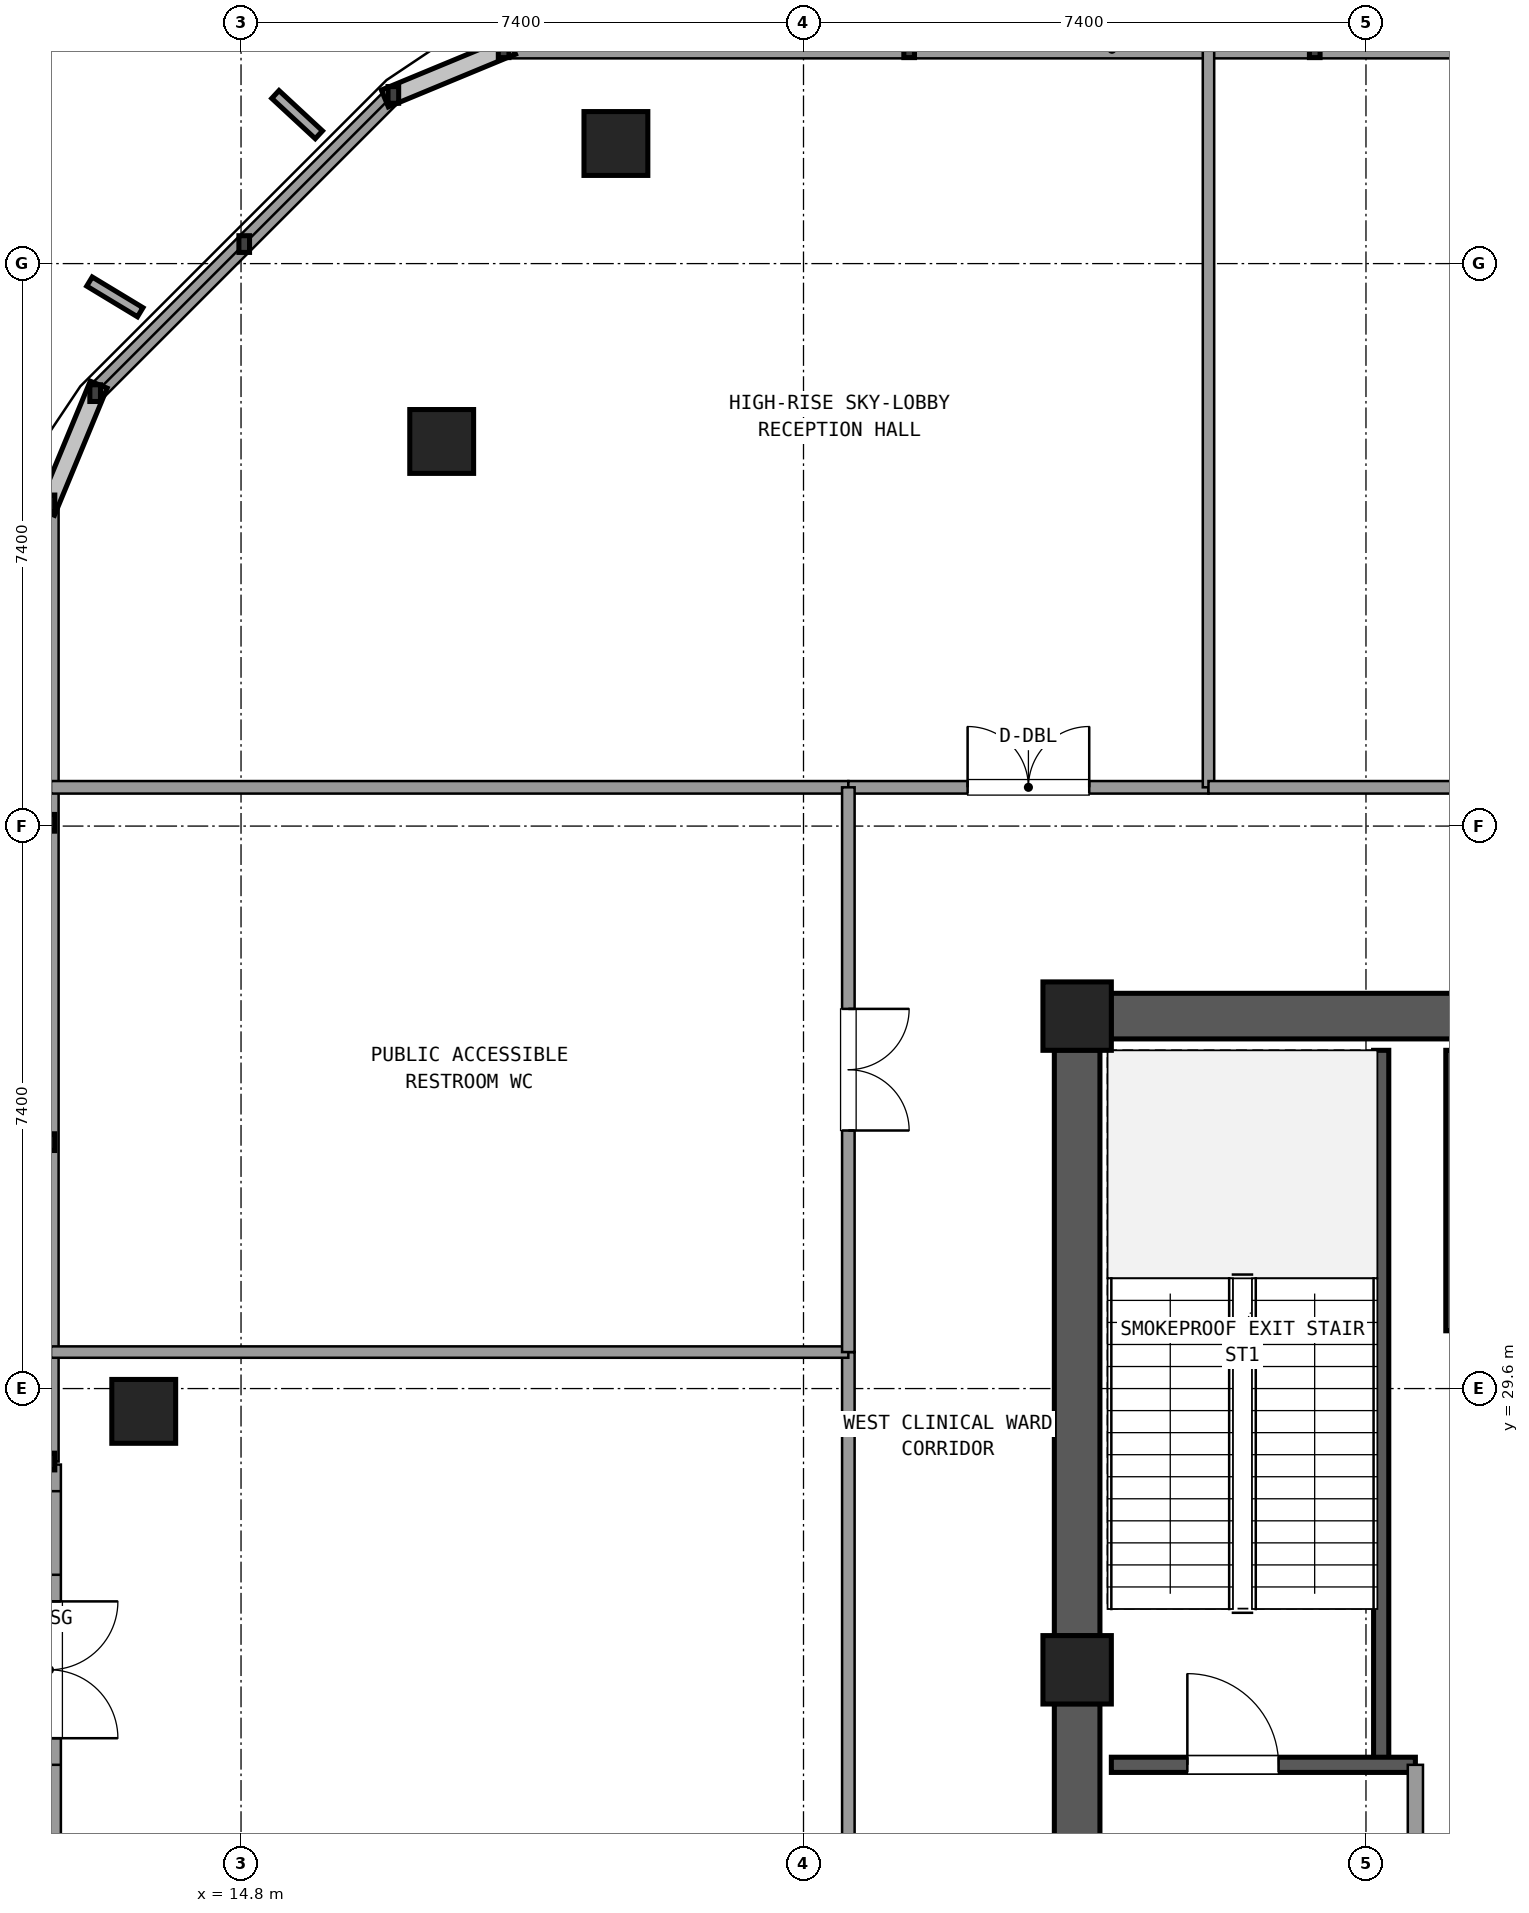
"""IFC4 building model, lengths in metres.
Left out: names, types, materials, properties, quantities, classifications, styles, units other than length and angle.
Written with IfcOpenShell. Run it as: python <this file> out.ifc"""

import sys

from ifc_helpers import new_model, si_unit, direction, frame, frame_2d, origin, origin_2d, place, context, subcontext, project, spatial, rectangle, extrude, element, fill, save


model = new_model("IFC4")
c1 = context("Model", 3, precision=1e-05, world=origin(), true_north=direction((0.0, 1.0)))
c2 = subcontext(c1, "Body", "Model", "MODEL_VIEW")
j1 = project(units=[si_unit("LENGTHUNIT", "METRE"), si_unit("PLANEANGLEUNIT", "RADIAN")], contexts=[c1])
p1 = place(None, origin())
s1 = spatial("IfcSite", under=j1, at=p1, CompositionType="ELEMENT")
p2 = place(p1, origin())
s2 = spatial("IfcBuilding", under=s1, at=p2, CompositionType="ELEMENT")
p3 = place(p2, frame((0.0, 0.0, 237.06)))
s3 = spatial("IfcBuildingStorey", under=s2, at=p3, CompositionType="ELEMENT", Elevation=237.06)
for number, where, z_axis, x_axis in (
    (1, (25.8, 34.5, 0.0), (0.0, 0.0, 1.0), (1.0, 0.0, 0.0)),
    (2, (25.8, 25.9, 0.0), (0.0, 0.0, 1.0), (1.0, 0.0, 0.0)),
):
    element("IfcColumn", number, at=place(p3, frame(where, z_axis=z_axis, x_axis=x_axis)), inside=s3, PredefinedType="COLUMN", context=c2, shape_type="SweptSolid", body=[
        extrude(rectangle(XDim=0.9, YDim=0.9, at=origin_2d()), origin(), (0.0, 0.0, 1.0), 5.76),
    ])
p4 = place(p3, frame((36.555, 34.5, 0.0), z_axis=(0.0, 0.0, 1.0), x_axis=(-1.0, 0.0, 0.0)))
e3 = element("IfcWall", 3, at=p4, inside=s3, PredefinedType="SHEAR", context=c2, shape_type="SweptSolid", body=[
    extrude(rectangle(XDim=10.31, YDim=0.6, at=frame_2d((5.155, 0.0))), origin(), (0.0, 0.0, 1.0), 5.48),
])
p5 = place(p4, frame((4.155, 0.0, 0.0)))
e4 = element("IfcOpeningElement", 4, at=p5, cuts=e3, PredefinedType="OPENING", context=c2, shape_type="SweptSolid", body=[
    extrude(rectangle(XDim=1.2, YDim=2.15, at=frame_2d((0.6, 1.075))), frame((0.0, 0.31, 0.0), z_axis=(0.0, -1.0, 0.0), x_axis=(1.0, 0.0, 0.0)), (0.0, 0.0, 1.0), 0.62),
])
p6 = place(p3, frame((25.8, 34.055, 0.0), z_axis=(0.0, 0.0, 1.0), x_axis=(0.0, -1.0, 0.0)))
e5 = element("IfcWall", 5, at=p6, inside=s3, PredefinedType="SHEAR", context=c2, shape_type="SweptSolid", body=[
    extrude(rectangle(XDim=7.71, YDim=0.6, at=frame_2d((3.855, 0.0))), origin(), (0.0, 0.0, 1.0), 5.48),
])
p7 = place(p3, frame((25.8, 25.455, 0.0), z_axis=(0.0, 0.0, 1.0), x_axis=(0.0, -1.0, 0.0)))
e6 = element("IfcWall", 6, at=p7, inside=s3, PredefinedType="SHEAR", context=c2, shape_type="SweptSolid", body=[
    extrude(rectangle(XDim=7.71, YDim=0.6, at=frame_2d((3.855, 0.0))), origin(), (0.0, 0.0, 1.0), 5.48),
])
p8 = place(p7, frame((2.205, 0.0, 0.0)))
e7 = element("IfcOpeningElement", 7, at=p8, cuts=e6, PredefinedType="OPENING", context=c2, shape_type="SweptSolid", body=[
    extrude(rectangle(XDim=1.2, YDim=2.15, at=frame_2d((0.6, 1.075))), frame((0.0, 0.31, 0.0), z_axis=(0.0, -1.0, 0.0), x_axis=(1.0, 0.0, 0.0)), (0.0, 0.0, 1.0), 0.62),
])
for number, where, z_axis, x_axis in (
    (8, (19.732, 45.98, 0.0), (0.0, 0.0, 1.0), (1.0, 0.0, 0.0)),
    (9, (17.44, 42.06, 0.0), (0.0, 0.0, 1.0), (1.0, 0.0, 0.0)),
    (10, (13.52, 29.3, 0.0), (0.0, 0.0, 1.0), (1.0, 0.0, 0.0)),
):
    element("IfcColumn", number, at=place(p3, frame(where, z_axis=z_axis, x_axis=x_axis)), inside=s3, PredefinedType="COLUMN", context=c2, shape_type="SweptSolid", body=[
        extrude(rectangle(XDim=0.84, YDim=0.84, at=origin_2d()), origin(), (0.0, 0.0, 1.0), 5.76),
    ])
p9 = place(p3, frame((34.261, 47.22, 0.0), z_axis=(0.0, 0.0, 1.0), x_axis=(-1.0, 0.0, 0.0)))
e11 = element("IfcWall", 11, at=p9, inside=s3, PredefinedType="SOLIDWALL", context=c2, shape_type="SweptSolid", body=[
    extrude(rectangle(XDim=16.006, YDim=0.24, at=frame_2d((8.003, 0.0))), origin(), (0.0, 0.0, 1.0), 0.85),
])
p10 = place(p3, frame((16.804, 46.619, 0.0), z_axis=(0.0, 0.0, 1.0), x_axis=(-0.707106781187, -0.707106781187, 0.0)))
e12 = element("IfcWall", 12, at=p10, inside=s3, PredefinedType="SOLIDWALL", context=c2, shape_type="SweptSolid", body=[
    extrude(rectangle(XDim=5.548, YDim=0.24, at=frame_2d((2.774, 0.0))), origin(), (0.0, 0.0, 1.0), 0.85),
])
p11 = place(p3, frame((12.28, 28.6, 0.0), z_axis=(0.0, 0.0, 1.0), x_axis=(0.0, -1.0, 0.0)))
e13 = element("IfcWall", 13, at=p11, inside=s3, PredefinedType="SOLIDWALL", context=c2, shape_type="SweptSolid", body=[
    extrude(rectangle(XDim=5.4, YDim=0.3, at=frame_2d((2.7, 0.0))), origin(), (0.0, 0.0, 1.0), 4.85),
])
p12 = place(p11, frame((1.8, 0.0, 0.0)))
e14 = element("IfcOpeningElement", 14, at=p12, cuts=e13, PredefinedType="OPENING", context=c2, shape_type="SweptSolid", body=[
    extrude(rectangle(XDim=1.8, YDim=2.25, at=frame_2d((0.9, 1.125))), frame((0.0, 0.16, 0.0), z_axis=(0.0, -1.0, 0.0), x_axis=(1.0, 0.0, 0.0)), (0.0, 0.0, 1.0), 0.32),
])
p13 = place(p11, frame((0.35, 0.0, 0.4)))
e15 = element("IfcOpeningElement", 15, at=p13, cuts=e13, PredefinedType="OPENING", context=c2, shape_type="SweptSolid", body=[
    extrude(rectangle(XDim=1.1, YDim=1.8, at=frame_2d((0.55, 0.9))), frame((0.0, 0.16, 0.0), z_axis=(0.0, -1.0, 0.0), x_axis=(1.0, 0.0, 0.0)), (0.0, 0.0, 1.0), 0.32),
])
p14 = place(p11, frame((3.95, 0.0, 0.4)))
e16 = element("IfcOpeningElement", 16, at=p14, cuts=e13, PredefinedType="OPENING", context=c2, shape_type="SweptSolid", body=[
    extrude(rectangle(XDim=1.1, YDim=1.8, at=frame_2d((0.55, 0.9))), frame((0.0, 0.16, 0.0), z_axis=(0.0, -1.0, 0.0), x_axis=(1.0, 0.0, 0.0)), (0.0, 0.0, 1.0), 0.32),
])
p15 = place(p3, frame((12.28, 41.245, 0.0), z_axis=(0.0, 0.0, 1.0), x_axis=(0.0, -1.0, 0.0)))
e17 = element("IfcWall", 17, at=p15, inside=s3, PredefinedType="SOLIDWALL", context=c2, shape_type="SweptSolid", body=[
    extrude(rectangle(XDim=12.605, YDim=0.24, at=frame_2d((6.303, 0.0))), origin(), (0.0, 0.0, 1.0), 0.85),
])
p16 = place(p3, frame((29.8, 24.65, 0.0), z_axis=(0.0, 0.0, 1.0), x_axis=(0.0, 1.0, 0.0)))
e18 = element("IfcWall", 18, at=p16, inside=s3, PredefinedType="SHEAR", context=c2, shape_type="SweptSolid", body=[
    extrude(rectangle(XDim=9.4, YDim=0.2, at=frame_2d((4.7, 0.0))), origin(), (0.0, 0.0, 1.0), 5.48),
])
p17 = place(p3, frame((26.25, 24.65, 0.0), z_axis=(0.0, 0.0, 1.0), x_axis=(1.0, 0.0, 0.0)))
e19 = element("IfcWall", 19, at=p17, inside=s3, PredefinedType="SHEAR", context=c2, shape_type="SweptSolid", body=[
    extrude(rectangle(XDim=4.0, YDim=0.2, at=frame_2d((2.0, 0.0))), origin(), (0.0, 0.0, 1.0), 5.48),
])
p18 = place(p17, frame((1.0, 0.0, 0.0)))
e20 = element("IfcOpeningElement", 20, at=p18, cuts=e19, PredefinedType="OPENING", context=c2, shape_type="SweptSolid", body=[
    extrude(rectangle(XDim=1.2, YDim=2.15, at=frame_2d((0.6, 1.075))), frame((0.0, 0.11, 0.0), z_axis=(0.0, -1.0, 0.0), x_axis=(1.0, 0.0, 0.0)), (0.0, 0.0, 1.0), 0.22),
])
p19 = place(p3, frame((30.75, 30.36, 0.0), z_axis=(0.0, 0.0, 1.0), x_axis=(0.0, 1.0, 0.0)))
e21 = element("IfcWall", 21, at=p19, inside=s3, PredefinedType="SHEAR", context=c2, shape_type="SweptSolid", body=[
    extrude(rectangle(XDim=3.69, YDim=0.2, at=frame_2d((1.845, 0.0))), origin(), (0.0, 0.0, 1.0), 5.48),
])
p20 = place(p3, frame((30.25, 17.75, 0.0), z_axis=(0.0, 0.0, 1.0), x_axis=(0.0, 1.0, 0.0)))
e22 = element("IfcWall", 22, at=p20, inside=s3, PredefinedType="SOLIDWALL", context=c2, shape_type="SweptSolid", body=[
    extrude(rectangle(XDim=6.9, YDim=0.2, at=frame_2d((3.45, 0.0))), origin(), (0.0, 0.0, 1.0), 4.77),
])
p21 = place(p20, frame((4.15, 0.0, 0.0)))
e23 = element("IfcOpeningElement", 23, at=p21, cuts=e22, PredefinedType="OPENING", context=c2, shape_type="SweptSolid", body=[
    extrude(rectangle(XDim=1.2, YDim=2.15, at=frame_2d((0.6, 1.075))), frame((0.0, 0.11, 0.0), z_axis=(0.0, -1.0, 0.0), x_axis=(1.0, 0.0, 0.0)), (0.0, 0.0, 1.0), 0.22),
])
p22 = place(p3, frame((12.3, 37.51, 0.0), z_axis=(0.0, 0.0, 1.0), x_axis=(1.0, 0.0, 0.0)))
e24 = element("IfcWall", 24, at=p22, inside=s3, PredefinedType="PARTITIONING", context=c2, shape_type="SweptSolid", body=[
    extrude(rectangle(XDim=10.49, YDim=0.165, at=frame_2d((5.245, 0.0))), origin(), (0.0, 0.0, 1.0), 4.77),
])
p23 = place(p3, frame((22.79, 37.51, 0.0), z_axis=(0.0, 0.0, 1.0), x_axis=(1.0, 0.0, 0.0)))
e25 = element("IfcWall", 25, at=p23, inside=s3, PredefinedType="PARTITIONING", context=c2, shape_type="SweptSolid", body=[
    extrude(rectangle(XDim=4.738, YDim=0.165, at=frame_2d((2.369, 0.0))), origin(), (0.0, 0.0, 1.0), 4.77),
])
p24 = place(p23, frame((1.569, 0.0, 0.0)))
e26 = element("IfcOpeningElement", 26, at=p24, cuts=e25, PredefinedType="OPENING", context=c2, shape_type="SweptSolid", body=[
    extrude(rectangle(XDim=1.6, YDim=2.2, at=frame_2d((0.8, 1.1))), frame((0.0, 0.093, 0.0), z_axis=(0.0, -1.0, 0.0), x_axis=(1.0, 0.0, 0.0)), (0.0, 0.0, 1.0), 0.185),
])
p25 = place(p3, frame((27.528, 37.51, 0.0), z_axis=(0.0, 0.0, 1.0), x_axis=(0.0, 1.0, 0.0)))
e27 = element("IfcWall", 27, at=p25, inside=s3, PredefinedType="PARTITIONING", context=c2, shape_type="SweptSolid", body=[
    extrude(rectangle(XDim=9.69, YDim=0.15, at=frame_2d((4.845, 0.0))), origin(), (0.0, 0.0, 1.0), 4.77),
])
p26 = place(p3, frame((27.528, 37.51, 0.0), z_axis=(0.0, 0.0, 1.0), x_axis=(1.0, 0.0, 0.0)))
e28 = element("IfcWall", 28, at=p26, inside=s3, PredefinedType="PARTITIONING", context=c2, shape_type="SweptSolid", body=[
    extrude(rectangle(XDim=17.997, YDim=0.165, at=frame_2d((8.999, 0.0))), origin(), (0.0, 0.0, 1.0), 4.77),
])
p27 = place(p26, frame((7.438, 0.0, 0.0)))
e29 = element("IfcOpeningElement", 29, at=p27, cuts=e28, PredefinedType="OPENING", context=c2, shape_type="SweptSolid", body=[
    extrude(rectangle(XDim=1.6, YDim=2.2, at=frame_2d((0.8, 1.1))), frame((0.0, 0.093, 0.0), z_axis=(0.0, -1.0, 0.0), x_axis=(1.0, 0.0, 0.0)), (0.0, 0.0, 1.0), 0.185),
])
p28 = place(p3, frame((22.79, 14.29, 0.0), z_axis=(0.0, 0.0, 1.0), x_axis=(0.0, 1.0, 0.0)))
e30 = element("IfcWall", 30, at=p28, inside=s3, PredefinedType="PARTITIONING", context=c2, shape_type="SweptSolid", body=[
    extrude(rectangle(XDim=15.79, YDim=0.165, at=frame_2d((7.895, 0.0))), origin(), (0.0, 0.0, 1.0), 4.77),
])
p29 = place(p28, frame((7.095, 0.0, 0.0)))
e31 = element("IfcOpeningElement", 31, at=p29, cuts=e30, PredefinedType="OPENING", context=c2, shape_type="SweptSolid", body=[
    extrude(rectangle(XDim=1.6, YDim=2.2, at=frame_2d((0.8, 1.1))), frame((0.0, 0.093, 0.0), z_axis=(0.0, -1.0, 0.0), x_axis=(1.0, 0.0, 0.0)), (0.0, 0.0, 1.0), 0.185),
])
p30 = place(p3, frame((22.79, 30.08, 0.0), z_axis=(0.0, 0.0, 1.0), x_axis=(-1.0, 0.0, 0.0)))
e32 = element("IfcWall", 32, at=p30, inside=s3, PredefinedType="PARTITIONING", context=c2, shape_type="SweptSolid", body=[
    extrude(rectangle(XDim=10.49, YDim=0.15, at=frame_2d((5.245, 0.0))), origin(), (0.0, 0.0, 1.0), 4.77),
])
p31 = place(p3, frame((22.79, 30.08, 0.0), z_axis=(0.0, 0.0, 1.0), x_axis=(0.0, 1.0, 0.0)))
e33 = element("IfcWall", 33, at=p31, inside=s3, PredefinedType="PARTITIONING", context=c2, shape_type="SweptSolid", body=[
    extrude(rectangle(XDim=7.43, YDim=0.165, at=frame_2d((3.715, 0.0))), origin(), (0.0, 0.0, 1.0), 4.77),
])
p32 = place(p31, frame((2.915, 0.0, 0.0)))
e34 = element("IfcOpeningElement", 34, at=p32, cuts=e33, PredefinedType="OPENING", context=c2, shape_type="SweptSolid", body=[
    extrude(rectangle(XDim=1.6, YDim=2.2, at=frame_2d((0.8, 1.1))), frame((0.0, 0.093, 0.0), z_axis=(0.0, -1.0, 0.0), x_axis=(1.0, 0.0, 0.0)), (0.0, 0.0, 1.0), 0.185),
])
p33 = place(p18, origin())
e35 = element("IfcDoor", 35, at=p33, inside=s3, OperationType="SINGLE_SWING_LEFT", PredefinedType="DOOR", context=c2, shape_type="SweptSolid", body=[
    extrude(rectangle(XDim=1.2, YDim=2.15, at=frame_2d((0.6, 1.075))), frame((0.0, 0.025, 0.0), z_axis=(0.0, -1.0, 0.0), x_axis=(1.0, 0.0, 0.0)), (0.0, 0.0, 1.0), 0.05),
])
fill(e20, e35)
p34 = place(p24, origin())
e36 = element("IfcDoor", 36, at=p34, inside=s3, OperationType="DOUBLE_DOOR_SINGLE_SWING", PredefinedType="DOOR", context=c2, shape_type="SweptSolid", body=[
    extrude(rectangle(XDim=1.6, YDim=2.2, at=frame_2d((0.8, 1.1))), frame((0.0, 0.025, 0.0), z_axis=(0.0, -1.0, 0.0), x_axis=(1.0, 0.0, 0.0)), (0.0, 0.0, 1.0), 0.05),
])
fill(e26, e36)
p35 = place(p32, frame((1.6, 0.0, 0.0), z_axis=(0.0, 0.0, 1.0), x_axis=(-1.0, 0.0, 0.0)))
e37 = element("IfcDoor", 37, at=p35, inside=s3, OperationType="DOUBLE_DOOR_SINGLE_SWING", PredefinedType="DOOR", context=c2, shape_type="SweptSolid", body=[
    extrude(rectangle(XDim=1.6, YDim=2.2, at=frame_2d((0.8, 1.1))), frame((0.0, 0.025, 0.0), z_axis=(0.0, -1.0, 0.0), x_axis=(1.0, 0.0, 0.0)), (0.0, 0.0, 1.0), 0.05),
])
fill(e34, e37)
save(model, sys.argv[1])
